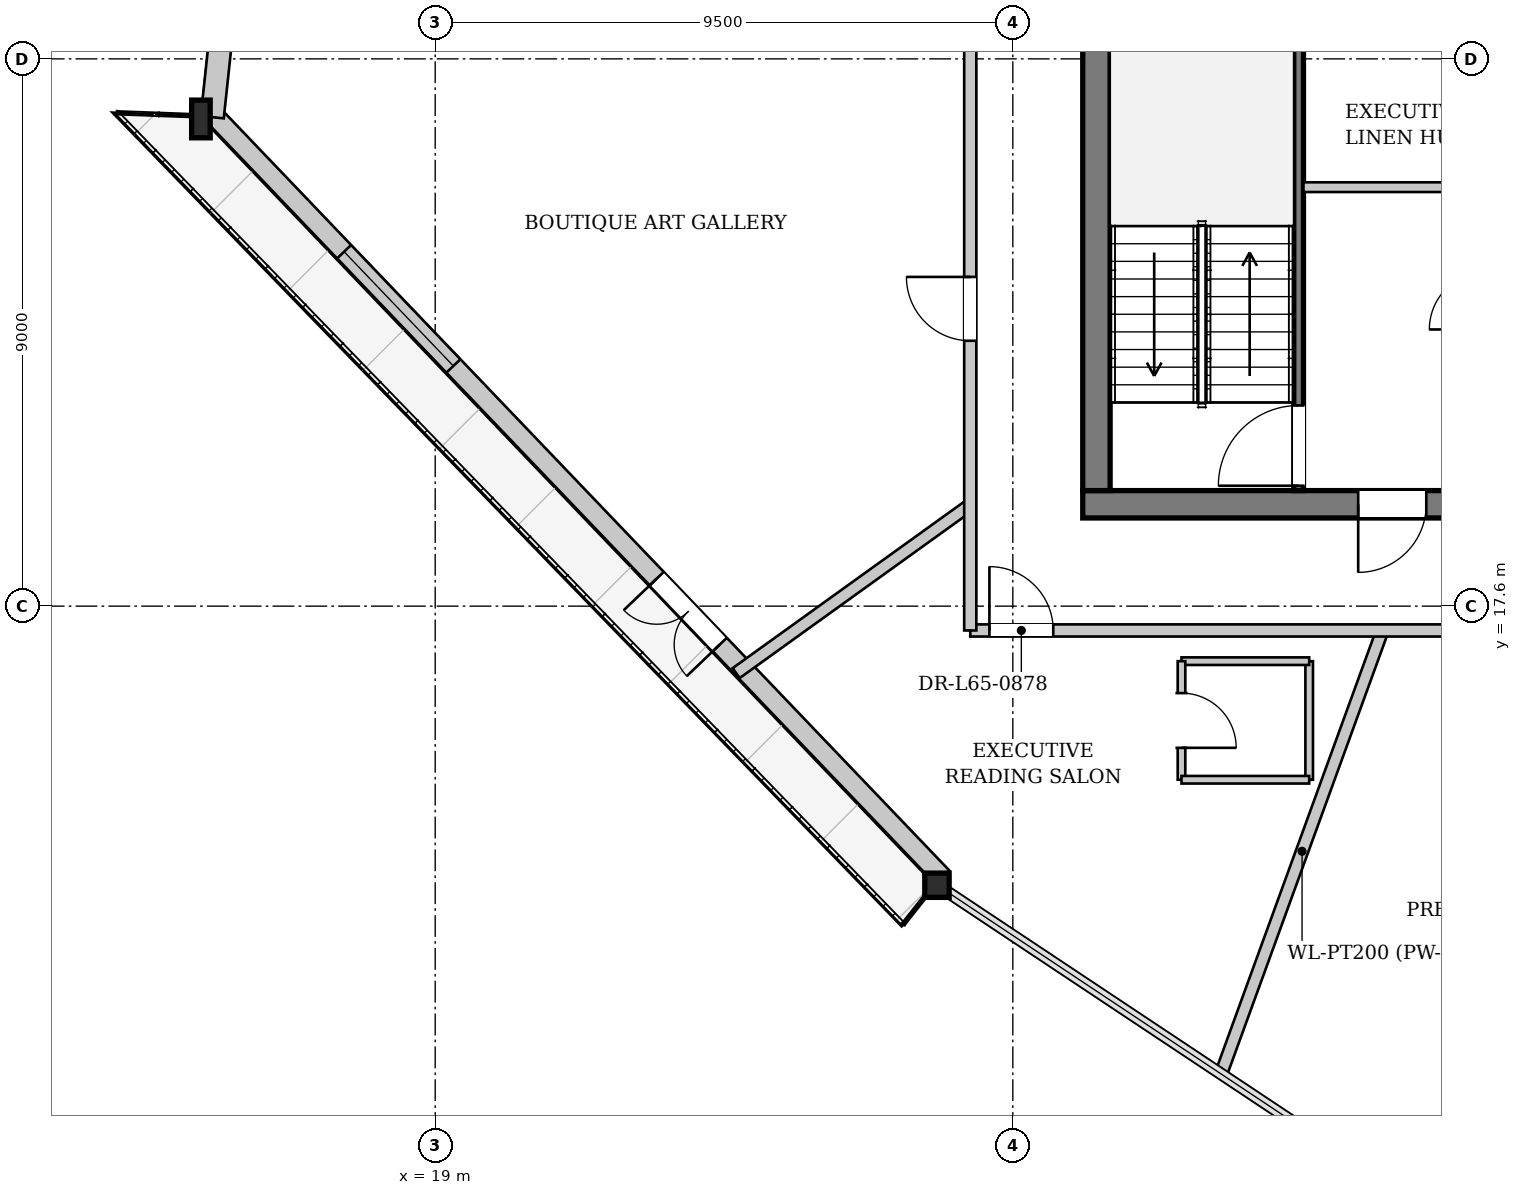
"""IFC4 building model, lengths in metres.
Left out: names, types, materials, properties, quantities, classifications, styles, units other than length and angle.
Written with IfcOpenShell. Run it as: python <this file> out.ifc"""

import sys

from ifc_helpers import new_model, si_unit, direction, frame, frame_2d, origin, origin_2d, place, context, subcontext, project, spatial, rectangle, i_section, extrude, source, transform, mapped, element, fill, save


model = new_model("IFC4")
c1 = context("Model", 3, precision=1e-05, world=origin(), true_north=direction((0.0, 1.0)))
c2 = subcontext(c1, "Body", "Model", "MODEL_VIEW")
j1 = project(units=[si_unit("LENGTHUNIT", "METRE"), si_unit("PLANEANGLEUNIT", "RADIAN")], contexts=[c1])
p1 = place(None, origin())
s1 = spatial("IfcSite", under=j1, at=p1, CompositionType="ELEMENT")
p2 = place(p1, origin())
s2 = spatial("IfcBuilding", under=s1, at=p2, CompositionType="ELEMENT")
p3 = place(p2, frame((0.0, 0.0, 245.3)))
s3 = spatial("IfcBuildingStorey", under=s2, at=p3, CompositionType="ELEMENT", Elevation=245.3)
m1 = source(origin(), c2, "Body", "SweptSolid", [
    extrude(i_section(OverallWidth=0.305, OverallDepth=0.62, WebThickness=0.021, FlangeThickness=0.04, at=origin_2d()), origin(), (0.0, 0.0, 1.0), 3.437),
])
p4 = place(p3, frame((15.145, 25.662, 0.0), z_axis=(0.00127877648, -0.029056643354, 0.999576948618), x_axis=(0.999032974154, 0.043967221356, 0.0)))
e1 = element("IfcColumn", 1, at=p4, inside=s3, PredefinedType="COLUMN", context=c2, shape_type="MappedRepresentation", body=[
    mapped(m1, transform((0.0, 0.0, 0.0), x_axis=(1.0, 0.0, 0.0), y_axis=(0.0, 1.0, 0.0), z_axis=(0.0, 0.0, 1.0), scale=1.0)),
])
m2 = source(origin(), c2, "Body", "SweptSolid", [
    extrude(i_section(OverallWidth=0.401, OverallDepth=0.399, WebThickness=0.022, FlangeThickness=0.034, at=origin_2d()), origin(), (0.0, 0.0, 1.0), 3.436),
])
p5 = place(p3, frame((27.223, 13.034, 0.0), z_axis=(0.017266606627, -0.013642750915, 0.999757840501), x_axis=(0.61995831768, 0.784634745814, 0.0)))
e2 = element("IfcColumn", 2, at=p5, inside=s3, PredefinedType="COLUMN", context=c2, shape_type="MappedRepresentation", body=[
    mapped(m2, transform((0.0, 0.0, 0.0), x_axis=(1.0, 0.0, 0.0), y_axis=(0.0, 1.0, 0.0), z_axis=(0.0, 0.0, 1.0), scale=1.0)),
])
p6 = place(p3, frame((27.338, 13.144, 0.0), z_axis=(0.0, 0.0, 1.0), x_axis=(-0.691178233251, 0.722684336263, 0.0)))
e3 = element("IfcWall", 3, at=p6, inside=s3, PredefinedType="SOLIDWALL", context=c2, shape_type="SweptSolid", body=[
    extrude(rectangle(XDim=17.474, YDim=0.32, at=frame_2d((8.737, 0.0))), origin(), (0.0, 0.0, 1.0), 2.872),
])
p7 = place(p6, frame((5.292, 0.0, 0.0)))
e4 = element("IfcOpeningElement", 4, at=p7, cuts=e3, PredefinedType="OPENING", context=c2, shape_type="SweptSolid", body=[
    extrude(rectangle(XDim=1.5, YDim=2.3, at=frame_2d((0.75, 1.15))), frame((0.0, 0.17, 0.0), z_axis=(0.0, -1.0, 0.0), x_axis=(1.0, 0.0, 0.0)), (0.0, 0.0, 1.0), 0.34),
])
p8 = place(p6, frame((11.631, 0.0, 0.402)))
e5 = element("IfcOpeningElement", 5, at=p8, cuts=e3, PredefinedType="OPENING", context=c2, shape_type="SweptSolid", body=[
    extrude(rectangle(XDim=2.6, YDim=2.35, at=frame_2d((1.3, 1.175))), frame((0.0, 0.17, 0.0), z_axis=(0.0, -1.0, 0.0), x_axis=(1.0, 0.0, 0.0)), (0.0, 0.0, 1.0), 0.34),
])
p9 = place(p3, frame((15.334, 25.642, 0.0), z_axis=(0.0, 0.0, 1.0), x_axis=(0.106260010947, 0.994338378055, 0.0)))
e6 = element("IfcWall", 6, at=p9, inside=s3, PredefinedType="SOLIDWALL", context=c2, shape_type="SweptSolid", body=[
    extrude(rectangle(XDim=3.251, YDim=0.38, at=frame_2d((1.625, 0.0))), origin(), (0.0, 0.0, 1.0), 2.872),
])
p10 = place(p3, frame((46.35, 19.275, 0.0), z_axis=(0.0, 0.0, 1.0), x_axis=(-1.0, 0.0, 0.0)))
e7 = element("IfcWall", 7, at=p10, inside=s3, PredefinedType="SHEAR", context=c2, shape_type="SweptSolid", body=[
    extrude(rectangle(XDim=16.7, YDim=0.45, at=frame_2d((8.35, 0.0))), origin(), (0.0, 0.0, 1.0), 3.38),
])
p11 = place(p10, frame((4.55, 0.0, 0.0)))
e8 = element("IfcOpeningElement", 8, at=p11, cuts=e7, PredefinedType="OPENING", context=c2, shape_type="SweptSolid", body=[
    extrude(rectangle(XDim=1.12, YDim=2.25, at=frame_2d((0.56, 1.125))), frame((0.0, 0.235, 0.0), z_axis=(0.0, -1.0, 0.0), x_axis=(1.0, 0.0, 0.0)), (0.0, 0.0, 1.0), 0.47),
])
p12 = place(p10, frame((11.05, 0.0, 0.0)))
e9 = element("IfcOpeningElement", 9, at=p12, cuts=e7, PredefinedType="OPENING", context=c2, shape_type="SweptSolid", body=[
    extrude(rectangle(XDim=1.12, YDim=2.25, at=frame_2d((0.56, 1.125))), frame((0.0, 0.235, 0.0), z_axis=(0.0, -1.0, 0.0), x_axis=(1.0, 0.0, 0.0)), (0.0, 0.0, 1.0), 0.47),
])
p13 = place(p3, frame((29.875, 19.5, 0.0), z_axis=(0.0, 0.0, 1.0), x_axis=(0.0, 1.0, 0.0)))
e10 = element("IfcWall", 10, at=p13, inside=s3, PredefinedType="SHEAR", context=c2, shape_type="SweptSolid", body=[
    extrude(rectangle(XDim=14.2, YDim=0.45, at=frame_2d((7.1, 0.0))), origin(), (0.0, 0.0, 1.0), 3.38),
])
p14 = place(p13, frame((7.42, 0.0, 0.0)))
e11 = element("IfcOpeningElement", 11, at=p14, cuts=e10, PredefinedType="OPENING", context=c2, shape_type="SweptSolid", body=[
    extrude(rectangle(XDim=1.6, YDim=2.2, at=frame_2d((0.8, 1.1))), frame((0.0, 0.235, 0.0), z_axis=(0.0, -1.0, 0.0), x_axis=(1.0, 0.0, 0.0)), (0.0, 0.0, 1.0), 0.47),
])
p15 = place(p3, frame((33.2, 19.5, 0.0), z_axis=(0.0, 0.0, 1.0), x_axis=(0.0, 1.0, 0.0)))
e12 = element("IfcWall", 12, at=p15, inside=s3, PredefinedType="PARTITIONING", context=c2, shape_type="SweptSolid", body=[
    extrude(rectangle(XDim=7.46, YDim=0.16, at=frame_2d((3.73, 0.0))), origin(), (0.0, 0.0, 1.0), 3.38),
])
p16 = place(p15, frame((0.08, 0.0, 0.0)))
e13 = element("IfcOpeningElement", 13, at=p16, cuts=e12, PredefinedType="OPENING", context=c2, shape_type="SweptSolid", body=[
    extrude(rectangle(XDim=1.32, YDim=2.2, at=frame_2d((0.66, 1.1))), frame((0.0, 0.09, 0.0), z_axis=(0.0, -1.0, 0.0), x_axis=(1.0, 0.0, 0.0)), (0.0, 0.0, 1.0), 0.18),
])
p17 = place(p3, frame((33.28, 24.49, 0.0), z_axis=(0.0, 0.0, 1.0), x_axis=(1.0, 0.0, 0.0)))
e14 = element("IfcWall", 14, at=p17, inside=s3, PredefinedType="PARTITIONING", context=c2, shape_type="SweptSolid", body=[
    extrude(rectangle(XDim=9.44, YDim=0.16, at=frame_2d((4.72, 0.0))), origin(), (0.0, 0.0, 1.0), 3.38),
])
p18 = place(p3, frame((34.579, 17.2, 0.0), z_axis=(0.0, 0.0, 1.0), x_axis=(-0.342024538429, -0.939691021087, 0.0)))
e15 = element("IfcWall", 15, at=p18, inside=s3, PredefinedType="PARTITIONING", context=c2, shape_type="SweptSolid", body=[
    extrude(rectangle(XDim=7.73, YDim=0.2, at=frame_2d((3.865, 0.0))), origin(), (0.0, 0.0, 1.0), 3.38),
])
p19 = place(p3, frame((27.8, 19.267, 0.0), z_axis=(0.0, 0.0, 1.0), x_axis=(-0.811958940091, -0.58371455319, 0.0)))
e16 = element("IfcWall", 16, at=p19, inside=s3, PredefinedType="PARTITIONING", context=c2, shape_type="SweptSolid", body=[
    extrude(rectangle(XDim=4.742, YDim=0.2, at=frame_2d((2.371, 0.0))), origin(), (0.0, 0.0, 1.0), 3.38),
])
p20 = place(p3, frame((33.374, 14.745, 0.0), z_axis=(0.0, 0.0, 1.0), x_axis=(0.0, 1.0, 0.0)))
e17 = element("IfcWall", 17, at=p20, inside=s3, PredefinedType="PARTITIONING", context=c2, shape_type="SweptSolid", body=[
    extrude(rectangle(XDim=1.95, YDim=0.125, at=frame_2d((0.975, 0.0))), origin(), (0.0, 0.0, 1.0), 3.38),
])
p21 = place(p3, frame((33.374, 16.695, 0.0), z_axis=(0.0, 0.0, 1.0), x_axis=(-1.0, 0.0, 0.0)))
e18 = element("IfcWall", 18, at=p21, inside=s3, PredefinedType="PARTITIONING", context=c2, shape_type="SweptSolid", body=[
    extrude(rectangle(XDim=2.1, YDim=0.125, at=frame_2d((1.05, 0.0))), origin(), (0.0, 0.0, 1.0), 3.38),
])
p22 = place(p3, frame((31.274, 16.695, 0.0), z_axis=(0.0, 0.0, 1.0), x_axis=(0.0, -1.0, 0.0)))
e19 = element("IfcWall", 19, at=p22, inside=s3, PredefinedType="PARTITIONING", context=c2, shape_type="SweptSolid", body=[
    extrude(rectangle(XDim=1.95, YDim=0.125, at=frame_2d((0.975, 0.0))), origin(), (0.0, 0.0, 1.0), 3.38),
])
p23 = place(p22, frame((0.525, 0.0, 0.0)))
e20 = element("IfcOpeningElement", 20, at=p23, cuts=e19, PredefinedType="OPENING", context=c2, shape_type="SweptSolid", body=[
    extrude(rectangle(XDim=0.9, YDim=2.1, at=frame_2d((0.45, 1.05))), frame((0.0, 0.073, 0.0), z_axis=(0.0, -1.0, 0.0), x_axis=(1.0, 0.0, 0.0)), (0.0, 0.0, 1.0), 0.145),
])
p24 = place(p3, frame((31.274, 14.745, 0.0), z_axis=(0.0, 0.0, 1.0), x_axis=(1.0, 0.0, 0.0)))
e21 = element("IfcWall", 21, at=p24, inside=s3, PredefinedType="PARTITIONING", context=c2, shape_type="SweptSolid", body=[
    extrude(rectangle(XDim=2.1, YDim=0.125, at=frame_2d((1.05, 0.0))), origin(), (0.0, 0.0, 1.0), 3.38),
])
p25 = place(p3, frame((27.8, 17.2, 0.0), z_axis=(0.0, 0.0, 1.0), x_axis=(1.0, 0.0, 0.0)))
e22 = element("IfcWall", 22, at=p25, inside=s3, PredefinedType="PARTITIONING", context=c2, shape_type="SweptSolid", body=[
    extrude(rectangle(XDim=20.4, YDim=0.2, at=frame_2d((10.2, 0.0))), origin(), (0.0, 0.0, 1.0), 3.38),
])
p26 = place(p25, frame((9.227, 0.0, 0.0)))
e23 = element("IfcOpeningElement", 23, at=p26, cuts=e22, PredefinedType="OPENING", context=c2, shape_type="SweptSolid", body=[
    extrude(rectangle(XDim=1.05, YDim=2.2, at=frame_2d((0.525, 1.1))), frame((0.0, 0.11, 0.0), z_axis=(0.0, -1.0, 0.0), x_axis=(1.0, 0.0, 0.0)), (0.0, 0.0, 1.0), 0.22),
])
p27 = place(p25, frame((17.263, 0.0, 0.0)))
e24 = element("IfcOpeningElement", 24, at=p27, cuts=e22, PredefinedType="OPENING", context=c2, shape_type="SweptSolid", body=[
    extrude(rectangle(XDim=1.05, YDim=2.2, at=frame_2d((0.525, 1.1))), frame((0.0, 0.11, 0.0), z_axis=(0.0, -1.0, 0.0), x_axis=(1.0, 0.0, 0.0)), (0.0, 0.0, 1.0), 0.22),
])
p28 = place(p25, frame((0.315, 0.0, 0.0)))
e25 = element("IfcOpeningElement", 25, at=p28, cuts=e22, PredefinedType="OPENING", context=c2, shape_type="SweptSolid", body=[
    extrude(rectangle(XDim=1.05, YDim=2.2, at=frame_2d((0.525, 1.1))), frame((0.0, 0.11, 0.0), z_axis=(0.0, -1.0, 0.0), x_axis=(1.0, 0.0, 0.0)), (0.0, 0.0, 1.0), 0.22),
])
p29 = place(p3, frame((27.8, 17.2, 0.0), z_axis=(0.0, 0.0, 1.0), x_axis=(0.0, 1.0, 0.0)))
e26 = element("IfcWall", 26, at=p29, inside=s3, PredefinedType="PARTITIONING", context=c2, shape_type="SweptSolid", body=[
    extrude(rectangle(XDim=18.8, YDim=0.2, at=frame_2d((9.4, 0.0))), origin(), (0.0, 0.0, 1.0), 3.38),
])
p30 = place(p29, frame((4.764, 0.0, 0.0)))
e27 = element("IfcOpeningElement", 27, at=p30, cuts=e26, PredefinedType="OPENING", context=c2, shape_type="SweptSolid", body=[
    extrude(rectangle(XDim=1.05, YDim=2.2, at=frame_2d((0.525, 1.1))), frame((0.0, 0.11, 0.0), z_axis=(0.0, -1.0, 0.0), x_axis=(1.0, 0.0, 0.0)), (0.0, 0.0, 1.0), 0.22),
])
m3 = source(origin(), c2, "Body", "SweptSolid", [
    extrude(rectangle(XDim=1.5, YDim=2.3, at=frame_2d((0.75, 1.15))), frame((0.0, 0.025, 0.0), z_axis=(0.0, -1.0, 0.0), x_axis=(1.0, 0.0, 0.0)), (0.0, 0.0, 1.0), 0.05),
])
p31 = place(p7, origin())
e28 = element("IfcDoor", 28, at=p31, inside=s3, OperationType="DOUBLE_DOOR_SINGLE_SWING", PredefinedType="DOOR", context=c2, shape_type="MappedRepresentation", body=[
    mapped(m3, transform((0.0, 0.0, 0.0), x_axis=(1.0, 0.0, 0.0), y_axis=(0.0, 1.0, 0.0), z_axis=(0.0, 0.0, 1.0), scale=1.0)),
])
fill(e4, e28)
m4 = source(origin(), c2, "Body", "SweptSolid", [
    extrude(rectangle(XDim=2.6, YDim=2.35, at=frame_2d((1.3, 1.175))), frame((0.0, 0.03, 0.0), z_axis=(0.0, -1.0, 0.0), x_axis=(1.0, 0.0, 0.0)), (0.0, 0.0, 1.0), 0.06),
])
p32 = place(p8, origin())
e29 = element("IfcWindow", 29, at=p32, inside=s3, PartitioningType="SINGLE_PANEL", PredefinedType="WINDOW", context=c2, shape_type="MappedRepresentation", body=[
    mapped(m4, transform((0.0, 0.0, 0.0), x_axis=(1.0, 0.0, 0.0), y_axis=(0.0, 1.0, 0.0), z_axis=(0.0, 0.0, 1.0), scale=1.0)),
])
fill(e5, e29)
m5 = source(origin(), c2, "Body", "SweptSolid", [
    extrude(rectangle(XDim=1.12, YDim=2.25, at=frame_2d((0.56, 1.125))), frame((0.0, 0.025, 0.0), z_axis=(0.0, -1.0, 0.0), x_axis=(1.0, 0.0, 0.0)), (0.0, 0.0, 1.0), 0.05),
])
p33 = place(p12, origin())
e30 = element("IfcDoor", 30, at=p33, inside=s3, OperationType="SINGLE_SWING_RIGHT", PredefinedType="DOOR", context=c2, shape_type="MappedRepresentation", body=[
    mapped(m5, transform((0.0, 0.0, 0.0), x_axis=(1.0, 0.0, 0.0), y_axis=(0.0, 1.0, 0.0), z_axis=(0.0, 0.0, 1.0), scale=1.0)),
])
fill(e9, e30)
m6 = source(origin(), c2, "Body", "SweptSolid", [
    extrude(rectangle(XDim=1.32, YDim=2.2, at=frame_2d((0.66, 1.1))), frame((0.0, 0.025, 0.0), z_axis=(0.0, -1.0, 0.0), x_axis=(1.0, 0.0, 0.0)), (0.0, 0.0, 1.0), 0.05),
])
p34 = place(p16, origin())
e31 = element("IfcDoor", 31, at=p34, inside=s3, OperationType="SINGLE_SWING_LEFT", PredefinedType="DOOR", context=c2, shape_type="MappedRepresentation", body=[
    mapped(m6, transform((0.0, 0.0, 0.0), x_axis=(1.0, 0.0, 0.0), y_axis=(0.0, 1.0, 0.0), z_axis=(0.0, 0.0, 1.0), scale=1.0)),
])
fill(e13, e31)
m7 = source(origin(), c2, "Body", "SweptSolid", [
    extrude(rectangle(XDim=0.9, YDim=2.1, at=frame_2d((0.45, 1.05))), frame((0.0, 0.025, 0.0), z_axis=(0.0, -1.0, 0.0), x_axis=(1.0, 0.0, 0.0)), (0.0, 0.0, 1.0), 0.05),
])
p35 = place(p23, origin())
e32 = element("IfcDoor", 32, at=p35, inside=s3, OperationType="SINGLE_SWING_RIGHT", PredefinedType="DOOR", context=c2, shape_type="MappedRepresentation", body=[
    mapped(m7, transform((0.0, 0.0, 0.0), x_axis=(1.0, 0.0, 0.0), y_axis=(0.0, 1.0, 0.0), z_axis=(0.0, 0.0, 1.0), scale=1.0)),
])
fill(e20, e32)
m8 = source(origin(), c2, "Body", "SweptSolid", [
    extrude(rectangle(XDim=1.05, YDim=2.2, at=frame_2d((0.525, 1.1))), frame((0.0, 0.025, 0.0), z_axis=(0.0, -1.0, 0.0), x_axis=(1.0, 0.0, 0.0)), (0.0, 0.0, 1.0), 0.05),
])
p36 = place(p28, origin())
e33 = element("IfcDoor", 33, at=p36, inside=s3, OperationType="SINGLE_SWING_LEFT", PredefinedType="DOOR", context=c2, shape_type="MappedRepresentation", body=[
    mapped(m8, transform((0.0, 0.0, 0.0), x_axis=(1.0, 0.0, 0.0), y_axis=(0.0, 1.0, 0.0), z_axis=(0.0, 0.0, 1.0), scale=1.0)),
])
fill(e25, e33)
p37 = place(p30, origin())
e34 = element("IfcDoor", 34, at=p37, inside=s3, OperationType="SINGLE_SWING_RIGHT", PredefinedType="DOOR", context=c2, shape_type="MappedRepresentation", body=[
    mapped(m8, transform((0.0, 0.0, 0.0), x_axis=(1.0, 0.0, 0.0), y_axis=(0.0, 1.0, 0.0), z_axis=(0.0, 0.0, 1.0), scale=1.0)),
])
fill(e27, e34)
save(model, sys.argv[1])
